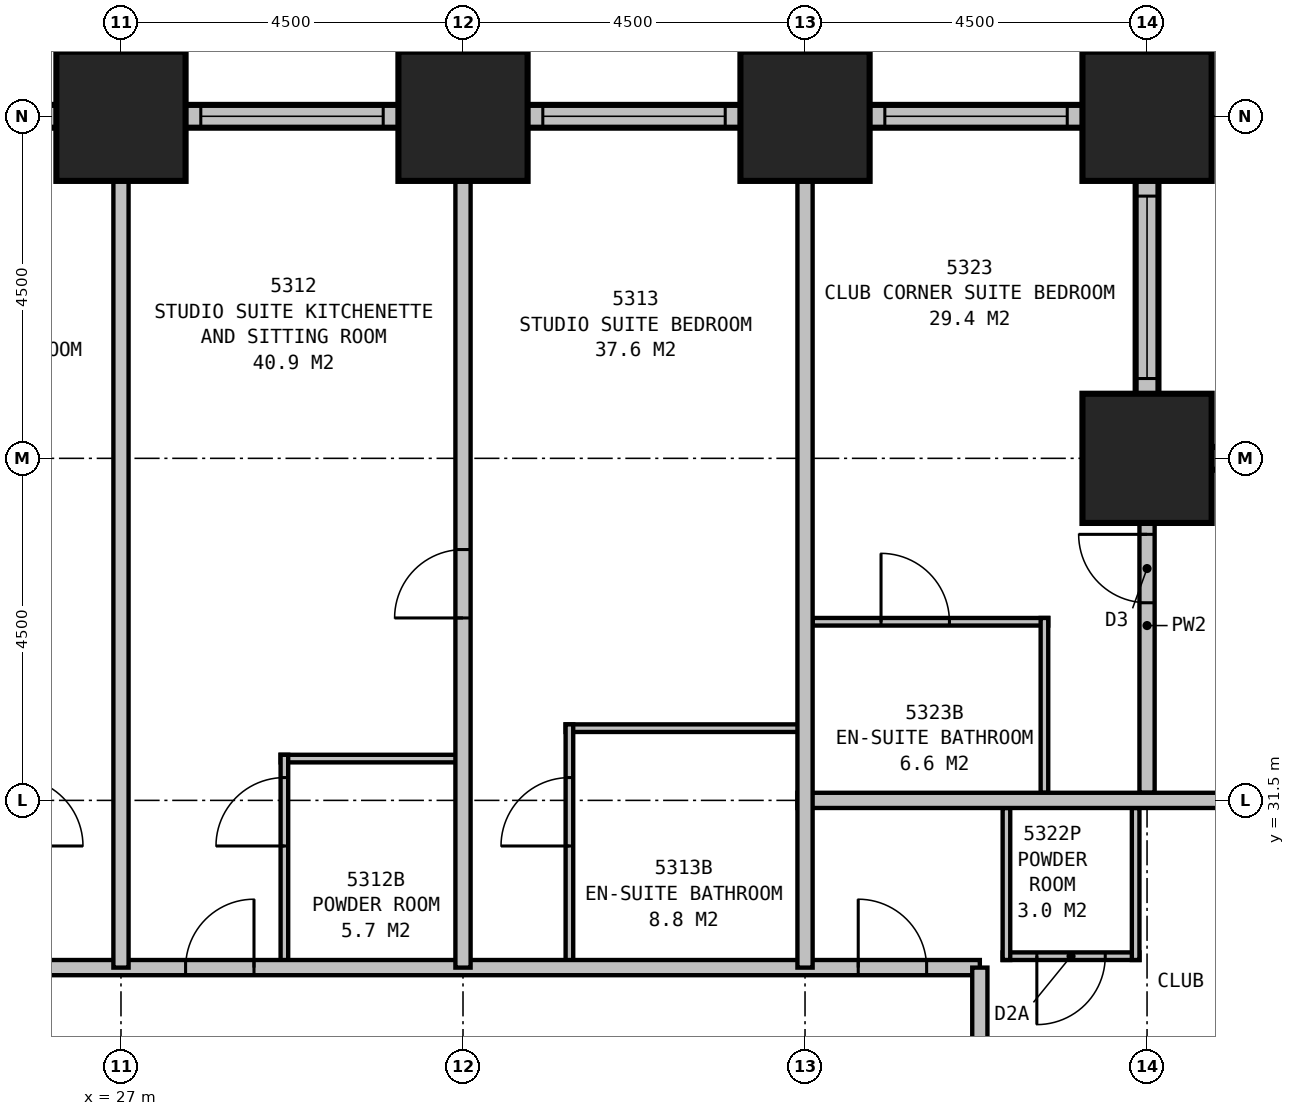
"""IFC4 building model, lengths in metres.
Left out: names, types, materials, properties, quantities, classifications, styles, units other than length and angle.
Written with IfcOpenShell. Run it as: python <this file> out.ifc"""

import sys

from ifc_helpers import new_model, si_unit, direction, frame, frame_2d, origin, origin_2d, place, context, subcontext, project, spatial, rectangle, extrude, element, fill, save


model = new_model("IFC4")
c1 = context("Model", 3, precision=1e-05, world=origin(), true_north=direction((0.0, 1.0)))
c2 = subcontext(c1, "Body", "Model", "MODEL_VIEW")
j1 = project(units=[si_unit("LENGTHUNIT", "METRE"), si_unit("PLANEANGLEUNIT", "RADIAN")], contexts=[c1])
p1 = place(None, origin())
s1 = spatial("IfcSite", under=j1, at=p1, CompositionType="ELEMENT")
p2 = place(p1, origin())
s2 = spatial("IfcBuilding", under=s1, at=p2, CompositionType="ELEMENT")
p3 = place(p2, frame((0.0, 0.0, 204.4)))
s3 = spatial("IfcBuildingStorey", under=s2, at=p3, CompositionType="ELEMENT", Elevation=204.4)
for number, where, z_axis, x_axis in (
    (1, (40.5, 36.0, 0.0), (0.0, 0.0, 1.0), (1.0, 0.0, 0.0)),
    (2, (40.5, 40.5, 0.0), (0.0, 0.0, 1.0), (1.0, 0.0, 0.0)),
    (3, (36.0, 40.5, 0.0), (0.0, 0.0, 1.0), (1.0, 0.0, 0.0)),
    (4, (31.5, 40.5, 0.0), (0.0, 0.0, 1.0), (1.0, 0.0, 0.0)),
    (5, (27.0, 40.5, 0.0), (0.0, 0.0, 1.0), (1.0, 0.0, 0.0)),
):
    element("IfcColumn", number, at=place(p3, frame(where, z_axis=z_axis, x_axis=x_axis)), inside=s3, PredefinedType="COLUMN", context=c2, shape_type="SweptSolid", body=[
        extrude(rectangle(XDim=1.7, YDim=1.7, at=origin_2d()), origin(), (0.0, 0.0, 1.0), 3.5),
    ])
p4 = place(p3, frame((45.65, 36.0, 0.0), z_axis=(0.0, 0.0, 1.0), x_axis=(-1.0, 0.0, 0.0)))
e6 = element("IfcWall", 6, at=p4, inside=s3, PredefinedType="STANDARD", context=c2, shape_type="SweptSolid", body=[
    extrude(rectangle(XDim=5.3, YDim=0.3, at=frame_2d((2.65, 0.0))), origin(), (0.0, 0.0, 1.0), 2.25),
])
p5 = place(p4, frame((1.45, 0.0, 0.5)))
e7 = element("IfcOpeningElement", 7, at=p5, cuts=e6, PredefinedType="OPENING", context=c2, shape_type="SweptSolid", body=[
    extrude(rectangle(XDim=2.4, YDim=1.6, at=frame_2d((1.2, 0.8))), frame((0.0, 0.16, 0.0), z_axis=(0.0, -1.0, 0.0), x_axis=(1.0, 0.0, 0.0)), (0.0, 0.0, 1.0), 0.32),
])
p6 = place(p3, frame((40.5, 35.85, 0.0), z_axis=(0.0, 0.0, 1.0), x_axis=(0.0, 1.0, 0.0)))
e8 = element("IfcWall", 8, at=p6, inside=s3, PredefinedType="STANDARD", context=c2, shape_type="SweptSolid", body=[
    extrude(rectangle(XDim=4.8, YDim=0.3, at=frame_2d((2.4, 0.0))), origin(), (0.0, 0.0, 1.0), 2.25),
])
p7 = place(p6, frame((1.2, 0.0, 0.5)))
e9 = element("IfcOpeningElement", 9, at=p7, cuts=e8, PredefinedType="OPENING", context=c2, shape_type="SweptSolid", body=[
    extrude(rectangle(XDim=2.4, YDim=1.6, at=frame_2d((1.2, 0.8))), frame((0.0, 0.16, 0.0), z_axis=(0.0, -1.0, 0.0), x_axis=(1.0, 0.0, 0.0)), (0.0, 0.0, 1.0), 0.32),
])
p8 = place(p3, frame((40.65, 40.5, 0.0), z_axis=(0.0, 0.0, 1.0), x_axis=(-1.0, 0.0, 0.0)))
e10 = element("IfcWall", 10, at=p8, inside=s3, PredefinedType="STANDARD", context=c2, shape_type="SweptSolid", body=[
    extrude(rectangle(XDim=31.8, YDim=0.3, at=frame_2d((15.9, 0.0))), origin(), (0.0, 0.0, 1.0), 2.25),
])
p9 = place(p8, frame((1.2, 0.0, 0.5)))
e11 = element("IfcOpeningElement", 11, at=p9, cuts=e10, PredefinedType="OPENING", context=c2, shape_type="SweptSolid", body=[
    extrude(rectangle(XDim=2.4, YDim=1.6, at=frame_2d((1.2, 0.8))), frame((0.0, 0.16, 0.0), z_axis=(0.0, -1.0, 0.0), x_axis=(1.0, 0.0, 0.0)), (0.0, 0.0, 1.0), 0.32),
])
p10 = place(p8, frame((5.7, 0.0, 0.5)))
e12 = element("IfcOpeningElement", 12, at=p10, cuts=e10, PredefinedType="OPENING", context=c2, shape_type="SweptSolid", body=[
    extrude(rectangle(XDim=2.4, YDim=1.6, at=frame_2d((1.2, 0.8))), frame((0.0, 0.16, 0.0), z_axis=(0.0, -1.0, 0.0), x_axis=(1.0, 0.0, 0.0)), (0.0, 0.0, 1.0), 0.32),
])
p11 = place(p8, frame((10.2, 0.0, 0.5)))
e13 = element("IfcOpeningElement", 13, at=p11, cuts=e10, PredefinedType="OPENING", context=c2, shape_type="SweptSolid", body=[
    extrude(rectangle(XDim=2.4, YDim=1.6, at=frame_2d((1.2, 0.8))), frame((0.0, 0.16, 0.0), z_axis=(0.0, -1.0, 0.0), x_axis=(1.0, 0.0, 0.0)), (0.0, 0.0, 1.0), 0.32),
])
p12 = place(p8, frame((14.7, 0.0, 0.5)))
e14 = element("IfcOpeningElement", 14, at=p12, cuts=e10, PredefinedType="OPENING", context=c2, shape_type="SweptSolid", body=[
    extrude(rectangle(XDim=2.4, YDim=1.6, at=frame_2d((1.2, 0.8))), frame((0.0, 0.16, 0.0), z_axis=(0.0, -1.0, 0.0), x_axis=(1.0, 0.0, 0.0)), (0.0, 0.0, 1.0), 0.32),
])
p13 = place(p8, frame((19.2, 0.0, 0.5)))
e15 = element("IfcOpeningElement", 15, at=p13, cuts=e10, PredefinedType="OPENING", context=c2, shape_type="SweptSolid", body=[
    extrude(rectangle(XDim=2.4, YDim=1.6, at=frame_2d((1.2, 0.8))), frame((0.0, 0.16, 0.0), z_axis=(0.0, -1.0, 0.0), x_axis=(1.0, 0.0, 0.0)), (0.0, 0.0, 1.0), 0.32),
])
p14 = place(p8, frame((23.7, 0.0, 0.5)))
e16 = element("IfcOpeningElement", 16, at=p14, cuts=e10, PredefinedType="OPENING", context=c2, shape_type="SweptSolid", body=[
    extrude(rectangle(XDim=2.4, YDim=1.6, at=frame_2d((1.2, 0.8))), frame((0.0, 0.16, 0.0), z_axis=(0.0, -1.0, 0.0), x_axis=(1.0, 0.0, 0.0)), (0.0, 0.0, 1.0), 0.32),
])
p15 = place(p8, frame((28.2, 0.0, 0.5)))
e17 = element("IfcOpeningElement", 17, at=p15, cuts=e10, PredefinedType="OPENING", context=c2, shape_type="SweptSolid", body=[
    extrude(rectangle(XDim=2.4, YDim=1.6, at=frame_2d((1.2, 0.8))), frame((0.0, 0.16, 0.0), z_axis=(0.0, -1.0, 0.0), x_axis=(1.0, 0.0, 0.0)), (0.0, 0.0, 1.0), 0.32),
])
p16 = place(p3, frame((11.2, 29.3, 0.0), z_axis=(0.0, 0.0, 1.0), x_axis=(1.0, 0.0, 0.0)))
e18 = element("IfcWall", 18, at=p16, inside=s3, PredefinedType="PARTITIONING", context=c2, shape_type="SweptSolid", body=[
    extrude(rectangle(XDim=27.1, YDim=0.2, at=frame_2d((13.55, 0.0))), origin(), (0.0, 0.0, 1.0), 3.25),
])
p17 = place(p16, frame((3.15, 0.0, 0.0)))
e19 = element("IfcOpeningElement", 19, at=p17, cuts=e18, PredefinedType="OPENING", context=c2, shape_type="SweptSolid", body=[
    extrude(rectangle(XDim=0.9, YDim=2.1, at=frame_2d((0.45, 1.05))), frame((0.0, 0.11, 0.0), z_axis=(0.0, -1.0, 0.0), x_axis=(1.0, 0.0, 0.0)), (0.0, 0.0, 1.0), 0.22),
])
p18 = place(p16, frame((16.65, 0.0, 0.0)))
e20 = element("IfcOpeningElement", 20, at=p18, cuts=e18, PredefinedType="OPENING", context=c2, shape_type="SweptSolid", body=[
    extrude(rectangle(XDim=0.9, YDim=2.1, at=frame_2d((0.45, 1.05))), frame((0.0, 0.11, 0.0), z_axis=(0.0, -1.0, 0.0), x_axis=(1.0, 0.0, 0.0)), (0.0, 0.0, 1.0), 0.22),
])
p19 = place(p16, frame((25.5, 0.0, 0.0)))
e21 = element("IfcOpeningElement", 21, at=p19, cuts=e18, PredefinedType="OPENING", context=c2, shape_type="SweptSolid", body=[
    extrude(rectangle(XDim=0.9, YDim=2.1, at=frame_2d((0.45, 1.05))), frame((0.0, 0.11, 0.0), z_axis=(0.0, -1.0, 0.0), x_axis=(1.0, 0.0, 0.0)), (0.0, 0.0, 1.0), 0.22),
])
p20 = place(p16, frame((0.7, 0.0, 0.0)))
e22 = element("IfcOpeningElement", 22, at=p20, cuts=e18, PredefinedType="OPENING", context=c2, shape_type="SweptSolid", body=[
    extrude(rectangle(XDim=0.9, YDim=2.1, at=frame_2d((0.45, 1.05))), frame((0.0, 0.11, 0.0), z_axis=(0.0, -1.0, 0.0), x_axis=(1.0, 0.0, 0.0)), (0.0, 0.0, 1.0), 0.22),
])
p21 = place(p3, frame((38.3, 10.6, 0.0), z_axis=(0.0, 0.0, 1.0), x_axis=(0.0, 1.0, 0.0)))
e23 = element("IfcWall", 23, at=p21, inside=s3, PredefinedType="PARTITIONING", context=c2, shape_type="SweptSolid", body=[
    extrude(rectangle(XDim=18.7, YDim=0.2, at=frame_2d((9.35, 0.0))), origin(), (0.0, 0.0, 1.0), 3.25),
])
p22 = place(p21, frame((6.95, 0.0, 0.0), z_axis=(0.0, 0.0, 1.0), x_axis=(-1.0, 0.0, 0.0)))
e24 = element("IfcOpeningElement", 24, at=p22, cuts=e23, PredefinedType="OPENING", context=c2, shape_type="SweptSolid", body=[
    extrude(rectangle(XDim=0.9, YDim=2.1, at=frame_2d((0.45, 1.05))), frame((0.0, 0.11, 0.0), z_axis=(0.0, -1.0, 0.0), x_axis=(1.0, 0.0, 0.0)), (0.0, 0.0, 1.0), 0.22),
])
p23 = place(p21, frame((10.9, 0.0, 0.0), z_axis=(0.0, 0.0, 1.0), x_axis=(-1.0, 0.0, 0.0)))
e25 = element("IfcOpeningElement", 25, at=p23, cuts=e23, PredefinedType="OPENING", context=c2, shape_type="SweptSolid", body=[
    extrude(rectangle(XDim=0.9, YDim=2.1, at=frame_2d((0.45, 1.05))), frame((0.0, 0.11, 0.0), z_axis=(0.0, -1.0, 0.0), x_axis=(1.0, 0.0, 0.0)), (0.0, 0.0, 1.0), 0.22),
])
p24 = place(p3, frame((27.0, 29.3, 0.0), z_axis=(0.0, 0.0, 1.0), x_axis=(0.0, 1.0, 0.0)))
e26 = element("IfcWall", 26, at=p24, inside=s3, PredefinedType="PARTITIONING", context=c2, shape_type="SweptSolid", body=[
    extrude(rectangle(XDim=11.2, YDim=0.2, at=frame_2d((5.6, 0.0))), origin(), (0.0, 0.0, 1.0), 2.25),
])
p25 = place(p3, frame((31.5, 29.3, 0.0), z_axis=(0.0, 0.0, 1.0), x_axis=(0.0, 1.0, 0.0)))
e27 = element("IfcWall", 27, at=p25, inside=s3, PredefinedType="PARTITIONING", context=c2, shape_type="SweptSolid", body=[
    extrude(rectangle(XDim=11.2, YDim=0.2, at=frame_2d((5.6, 0.0))), origin(), (0.0, 0.0, 1.0), 2.25),
])
p26 = place(p25, frame((4.6, 0.0, 0.0)))
e28 = element("IfcOpeningElement", 28, at=p26, cuts=e27, PredefinedType="OPENING", context=c2, shape_type="SweptSolid", body=[
    extrude(rectangle(XDim=0.9, YDim=2.1, at=frame_2d((0.45, 1.05))), frame((0.0, 0.11, 0.0), z_axis=(0.0, -1.0, 0.0), x_axis=(1.0, 0.0, 0.0)), (0.0, 0.0, 1.0), 0.22),
])
p27 = place(p3, frame((29.1, 32.05, 0.0), z_axis=(0.0, 0.0, 1.0), x_axis=(1.0, 0.0, 0.0)))
e29 = element("IfcWall", 29, at=p27, inside=s3, PredefinedType="PLUMBINGWALL", context=c2, shape_type="SweptSolid", body=[
    extrude(rectangle(XDim=2.4, YDim=0.1, at=frame_2d((1.2, 0.0))), origin(), (0.0, 0.0, 1.0), 3.25),
])
p28 = place(p3, frame((29.15, 29.3, 0.0), z_axis=(0.0, 0.0, 1.0), x_axis=(0.0, 1.0, 0.0)))
e30 = element("IfcWall", 30, at=p28, inside=s3, PredefinedType="PLUMBINGWALL", context=c2, shape_type="SweptSolid", body=[
    extrude(rectangle(XDim=2.8, YDim=0.1, at=frame_2d((1.4, 0.0))), origin(), (0.0, 0.0, 1.0), 3.25),
])
p29 = place(p28, frame((1.6, 0.0, 0.0)))
e31 = element("IfcOpeningElement", 31, at=p29, cuts=e30, PredefinedType="OPENING", context=c2, shape_type="SweptSolid", body=[
    extrude(rectangle(XDim=0.9, YDim=2.1, at=frame_2d((0.45, 1.05))), frame((0.0, 0.06, 0.0), z_axis=(0.0, -1.0, 0.0), x_axis=(1.0, 0.0, 0.0)), (0.0, 0.0, 1.0), 0.12),
])
p30 = place(p3, frame((32.85, 32.45, 0.0), z_axis=(0.0, 0.0, 1.0), x_axis=(1.0, 0.0, 0.0)))
e32 = element("IfcWall", 32, at=p30, inside=s3, PredefinedType="PLUMBINGWALL", context=c2, shape_type="SweptSolid", body=[
    extrude(rectangle(XDim=3.15, YDim=0.1, at=frame_2d((1.575, 0.0))), origin(), (0.0, 0.0, 1.0), 3.25),
])
p31 = place(p3, frame((32.9, 29.3, 0.0), z_axis=(0.0, 0.0, 1.0), x_axis=(0.0, 1.0, 0.0)))
e33 = element("IfcWall", 33, at=p31, inside=s3, PredefinedType="PLUMBINGWALL", context=c2, shape_type="SweptSolid", body=[
    extrude(rectangle(XDim=3.2, YDim=0.1, at=frame_2d((1.6, 0.0))), origin(), (0.0, 0.0, 1.0), 3.25),
])
p32 = place(p31, frame((1.6, 0.0, 0.0)))
e34 = element("IfcOpeningElement", 34, at=p32, cuts=e33, PredefinedType="OPENING", context=c2, shape_type="SweptSolid", body=[
    extrude(rectangle(XDim=0.9, YDim=2.1, at=frame_2d((0.45, 1.05))), frame((0.0, 0.06, 0.0), z_axis=(0.0, -1.0, 0.0), x_axis=(1.0, 0.0, 0.0)), (0.0, 0.0, 1.0), 0.12),
])
p33 = place(p3, frame((36.0, 29.3, 0.0), z_axis=(0.0, 0.0, 1.0), x_axis=(0.0, 1.0, 0.0)))
e35 = element("IfcWall", 35, at=p33, inside=s3, PredefinedType="PARTITIONING", context=c2, shape_type="SweptSolid", body=[
    extrude(rectangle(XDim=11.2, YDim=0.2, at=frame_2d((5.6, 0.0))), origin(), (0.0, 0.0, 1.0), 2.25),
])
p34 = place(p3, frame((35.9, 31.5, 0.0), z_axis=(0.0, 0.0, 1.0), x_axis=(1.0, 0.0, 0.0)))
e36 = element("IfcWall", 36, at=p34, inside=s3, PredefinedType="PARTITIONING", context=c2, shape_type="SweptSolid", body=[
    extrude(rectangle(XDim=10.099, YDim=0.2, at=frame_2d((5.05, 0.0))), origin(), (0.0, 0.0, 1.0), 3.25),
])
p35 = place(p34, frame((8.099, 0.0, 0.0)))
e37 = element("IfcOpeningElement", 37, at=p35, cuts=e36, PredefinedType="OPENING", context=c2, shape_type="SweptSolid", body=[
    extrude(rectangle(XDim=0.9, YDim=2.1, at=frame_2d((0.45, 1.05))), frame((0.0, 0.11, 0.0), z_axis=(0.0, -1.0, 0.0), x_axis=(1.0, 0.0, 0.0)), (0.0, 0.0, 1.0), 0.22),
])
p36 = place(p3, frame((40.35, 31.4, 0.0), z_axis=(0.0, 0.0, 1.0), x_axis=(0.0, -1.0, 0.0)))
e38 = element("IfcWall", 38, at=p36, inside=s3, PredefinedType="PLUMBINGWALL", context=c2, shape_type="SweptSolid", body=[
    extrude(rectangle(XDim=2.0, YDim=0.1, at=frame_2d((1.0, 0.0))), origin(), (0.0, 0.0, 1.0), 2.25),
])
p37 = place(p3, frame((38.65, 31.4, 0.0), z_axis=(0.0, 0.0, 1.0), x_axis=(0.0, -1.0, 0.0)))
e39 = element("IfcWall", 39, at=p37, inside=s3, PredefinedType="PLUMBINGWALL", context=c2, shape_type="SweptSolid", body=[
    extrude(rectangle(XDim=2.0, YDim=0.1, at=frame_2d((1.0, 0.0))), origin(), (0.0, 0.0, 1.0), 3.25),
])
p38 = place(p3, frame((38.6, 29.45, 0.0), z_axis=(0.0, 0.0, 1.0), x_axis=(1.0, 0.0, 0.0)))
e40 = element("IfcWall", 40, at=p38, inside=s3, PredefinedType="PLUMBINGWALL", context=c2, shape_type="SweptSolid", body=[
    extrude(rectangle(XDim=1.8, YDim=0.1, at=frame_2d((0.9, 0.0))), origin(), (0.0, 0.0, 1.0), 3.25),
])
p39 = place(p38, frame((1.35, 0.0, 0.0), z_axis=(0.0, 0.0, 1.0), x_axis=(-1.0, 0.0, 0.0)))
e41 = element("IfcOpeningElement", 41, at=p39, cuts=e40, PredefinedType="OPENING", context=c2, shape_type="SweptSolid", body=[
    extrude(rectangle(XDim=0.9, YDim=2.1, at=frame_2d((0.45, 1.05))), frame((0.0, 0.06, 0.0), z_axis=(0.0, -1.0, 0.0), x_axis=(1.0, 0.0, 0.0)), (0.0, 0.0, 1.0), 0.12),
])
p40 = place(p3, frame((40.5, 31.6, 0.0), z_axis=(0.0, 0.0, 1.0), x_axis=(0.0, 1.0, 0.0)))
e42 = element("IfcWall", 42, at=p40, inside=s3, PredefinedType="PARTITIONING", context=c2, shape_type="SweptSolid", body=[
    extrude(rectangle(XDim=4.4, YDim=0.2, at=frame_2d((2.2, 0.0))), origin(), (0.0, 0.0, 1.0), 2.25),
])
p41 = place(p40, frame((2.5, 0.0, 0.0)))
e43 = element("IfcOpeningElement", 43, at=p41, cuts=e42, PredefinedType="OPENING", context=c2, shape_type="SweptSolid", body=[
    extrude(rectangle(XDim=0.9, YDim=2.1, at=frame_2d((0.45, 1.05))), frame((0.0, 0.11, 0.0), z_axis=(0.0, -1.0, 0.0), x_axis=(1.0, 0.0, 0.0)), (0.0, 0.0, 1.0), 0.22),
])
p42 = place(p3, frame((39.15, 31.6, 0.0), z_axis=(0.0, 0.0, 1.0), x_axis=(0.0, 1.0, 0.0)))
e44 = element("IfcWall", 44, at=p42, inside=s3, PredefinedType="PLUMBINGWALL", context=c2, shape_type="SweptSolid", body=[
    extrude(rectangle(XDim=2.3, YDim=0.1, at=frame_2d((1.15, 0.0))), origin(), (0.0, 0.0, 1.0), 3.25),
])
p43 = place(p3, frame((36.1, 33.85, 0.0), z_axis=(0.0, 0.0, 1.0), x_axis=(1.0, 0.0, 0.0)))
e45 = element("IfcWall", 45, at=p43, inside=s3, PredefinedType="PLUMBINGWALL", context=c2, shape_type="SweptSolid", body=[
    extrude(rectangle(XDim=3.1, YDim=0.1, at=frame_2d((1.55, 0.0))), origin(), (0.0, 0.0, 1.0), 3.25),
])
p44 = place(p43, frame((0.9, 0.0, 0.0)))
e46 = element("IfcOpeningElement", 46, at=p44, cuts=e45, PredefinedType="OPENING", context=c2, shape_type="SweptSolid", body=[
    extrude(rectangle(XDim=0.9, YDim=2.1, at=frame_2d((0.45, 1.05))), frame((0.0, 0.06, 0.0), z_axis=(0.0, -1.0, 0.0), x_axis=(1.0, 0.0, 0.0)), (0.0, 0.0, 1.0), 0.12),
])
p45 = place(p7, origin())
e47 = element("IfcWindow", 47, at=p45, inside=s3, PartitioningType="SINGLE_PANEL", PredefinedType="WINDOW", context=c2, shape_type="SweptSolid", body=[
    extrude(rectangle(XDim=2.4, YDim=1.6, at=frame_2d((1.2, 0.8))), frame((0.0, 0.03, 0.0), z_axis=(0.0, -1.0, 0.0), x_axis=(1.0, 0.0, 0.0)), (0.0, 0.0, 1.0), 0.06),
])
fill(e9, e47)
p46 = place(p9, origin())
e48 = element("IfcWindow", 48, at=p46, inside=s3, PartitioningType="SINGLE_PANEL", PredefinedType="WINDOW", context=c2, shape_type="SweptSolid", body=[
    extrude(rectangle(XDim=2.4, YDim=1.6, at=frame_2d((1.2, 0.8))), frame((0.0, 0.03, 0.0), z_axis=(0.0, -1.0, 0.0), x_axis=(1.0, 0.0, 0.0)), (0.0, 0.0, 1.0), 0.06),
])
fill(e11, e48)
p47 = place(p10, origin())
e49 = element("IfcWindow", 49, at=p47, inside=s3, PartitioningType="SINGLE_PANEL", PredefinedType="WINDOW", context=c2, shape_type="SweptSolid", body=[
    extrude(rectangle(XDim=2.4, YDim=1.6, at=frame_2d((1.2, 0.8))), frame((0.0, 0.03, 0.0), z_axis=(0.0, -1.0, 0.0), x_axis=(1.0, 0.0, 0.0)), (0.0, 0.0, 1.0), 0.06),
])
fill(e12, e49)
p48 = place(p11, origin())
e50 = element("IfcWindow", 50, at=p48, inside=s3, PartitioningType="SINGLE_PANEL", PredefinedType="WINDOW", context=c2, shape_type="SweptSolid", body=[
    extrude(rectangle(XDim=2.4, YDim=1.6, at=frame_2d((1.2, 0.8))), frame((0.0, 0.03, 0.0), z_axis=(0.0, -1.0, 0.0), x_axis=(1.0, 0.0, 0.0)), (0.0, 0.0, 1.0), 0.06),
])
fill(e13, e50)
p49 = place(p18, origin())
e51 = element("IfcDoor", 51, at=p49, inside=s3, OperationType="SINGLE_SWING_RIGHT", PredefinedType="DOOR", context=c2, shape_type="SweptSolid", body=[
    extrude(rectangle(XDim=0.9, YDim=2.1, at=frame_2d((0.45, 1.05))), frame((0.0, 0.025, 0.0), z_axis=(0.0, -1.0, 0.0), x_axis=(1.0, 0.0, 0.0)), (0.0, 0.0, 1.0), 0.05),
])
fill(e20, e51)
p50 = place(p19, origin())
e52 = element("IfcDoor", 52, at=p50, inside=s3, OperationType="SINGLE_SWING_LEFT", PredefinedType="DOOR", context=c2, shape_type="SweptSolid", body=[
    extrude(rectangle(XDim=0.9, YDim=2.1, at=frame_2d((0.45, 1.05))), frame((0.0, 0.025, 0.0), z_axis=(0.0, -1.0, 0.0), x_axis=(1.0, 0.0, 0.0)), (0.0, 0.0, 1.0), 0.05),
])
fill(e21, e52)
p51 = place(p26, origin())
e53 = element("IfcDoor", 53, at=p51, inside=s3, OperationType="SINGLE_SWING_LEFT", PredefinedType="DOOR", context=c2, shape_type="SweptSolid", body=[
    extrude(rectangle(XDim=0.9, YDim=2.1, at=frame_2d((0.45, 1.05))), frame((0.0, 0.025, 0.0), z_axis=(0.0, -1.0, 0.0), x_axis=(1.0, 0.0, 0.0)), (0.0, 0.0, 1.0), 0.05),
])
fill(e28, e53)
p52 = place(p29, origin())
e54 = element("IfcDoor", 54, at=p52, inside=s3, OperationType="SINGLE_SWING_LEFT", PredefinedType="DOOR", context=c2, shape_type="SweptSolid", body=[
    extrude(rectangle(XDim=0.9, YDim=2.1, at=frame_2d((0.45, 1.05))), frame((0.0, 0.025, 0.0), z_axis=(0.0, -1.0, 0.0), x_axis=(1.0, 0.0, 0.0)), (0.0, 0.0, 1.0), 0.05),
])
fill(e31, e54)
p53 = place(p32, origin())
e55 = element("IfcDoor", 55, at=p53, inside=s3, OperationType="SINGLE_SWING_LEFT", PredefinedType="DOOR", context=c2, shape_type="SweptSolid", body=[
    extrude(rectangle(XDim=0.9, YDim=2.1, at=frame_2d((0.45, 1.05))), frame((0.0, 0.025, 0.0), z_axis=(0.0, -1.0, 0.0), x_axis=(1.0, 0.0, 0.0)), (0.0, 0.0, 1.0), 0.05),
])
fill(e34, e55)
p54 = place(p39, origin())
e56 = element("IfcDoor", 56, at=p54, inside=s3, OperationType="SINGLE_SWING_RIGHT", PredefinedType="DOOR", context=c2, shape_type="SweptSolid", body=[
    extrude(rectangle(XDim=0.9, YDim=2.1, at=frame_2d((0.45, 1.05))), frame((0.0, 0.025, 0.0), z_axis=(0.0, -1.0, 0.0), x_axis=(1.0, 0.0, 0.0)), (0.0, 0.0, 1.0), 0.05),
])
fill(e41, e56)
p55 = place(p41, origin())
e57 = element("IfcDoor", 57, at=p55, inside=s3, OperationType="SINGLE_SWING_RIGHT", PredefinedType="DOOR", context=c2, shape_type="SweptSolid", body=[
    extrude(rectangle(XDim=0.9, YDim=2.1, at=frame_2d((0.45, 1.05))), frame((0.0, 0.025, 0.0), z_axis=(0.0, -1.0, 0.0), x_axis=(1.0, 0.0, 0.0)), (0.0, 0.0, 1.0), 0.05),
])
fill(e43, e57)
p56 = place(p44, origin())
e58 = element("IfcDoor", 58, at=p56, inside=s3, OperationType="SINGLE_SWING_LEFT", PredefinedType="DOOR", context=c2, shape_type="SweptSolid", body=[
    extrude(rectangle(XDim=0.9, YDim=2.1, at=frame_2d((0.45, 1.05))), frame((0.0, 0.025, 0.0), z_axis=(0.0, -1.0, 0.0), x_axis=(1.0, 0.0, 0.0)), (0.0, 0.0, 1.0), 0.05),
])
fill(e46, e58)
save(model, sys.argv[1])
